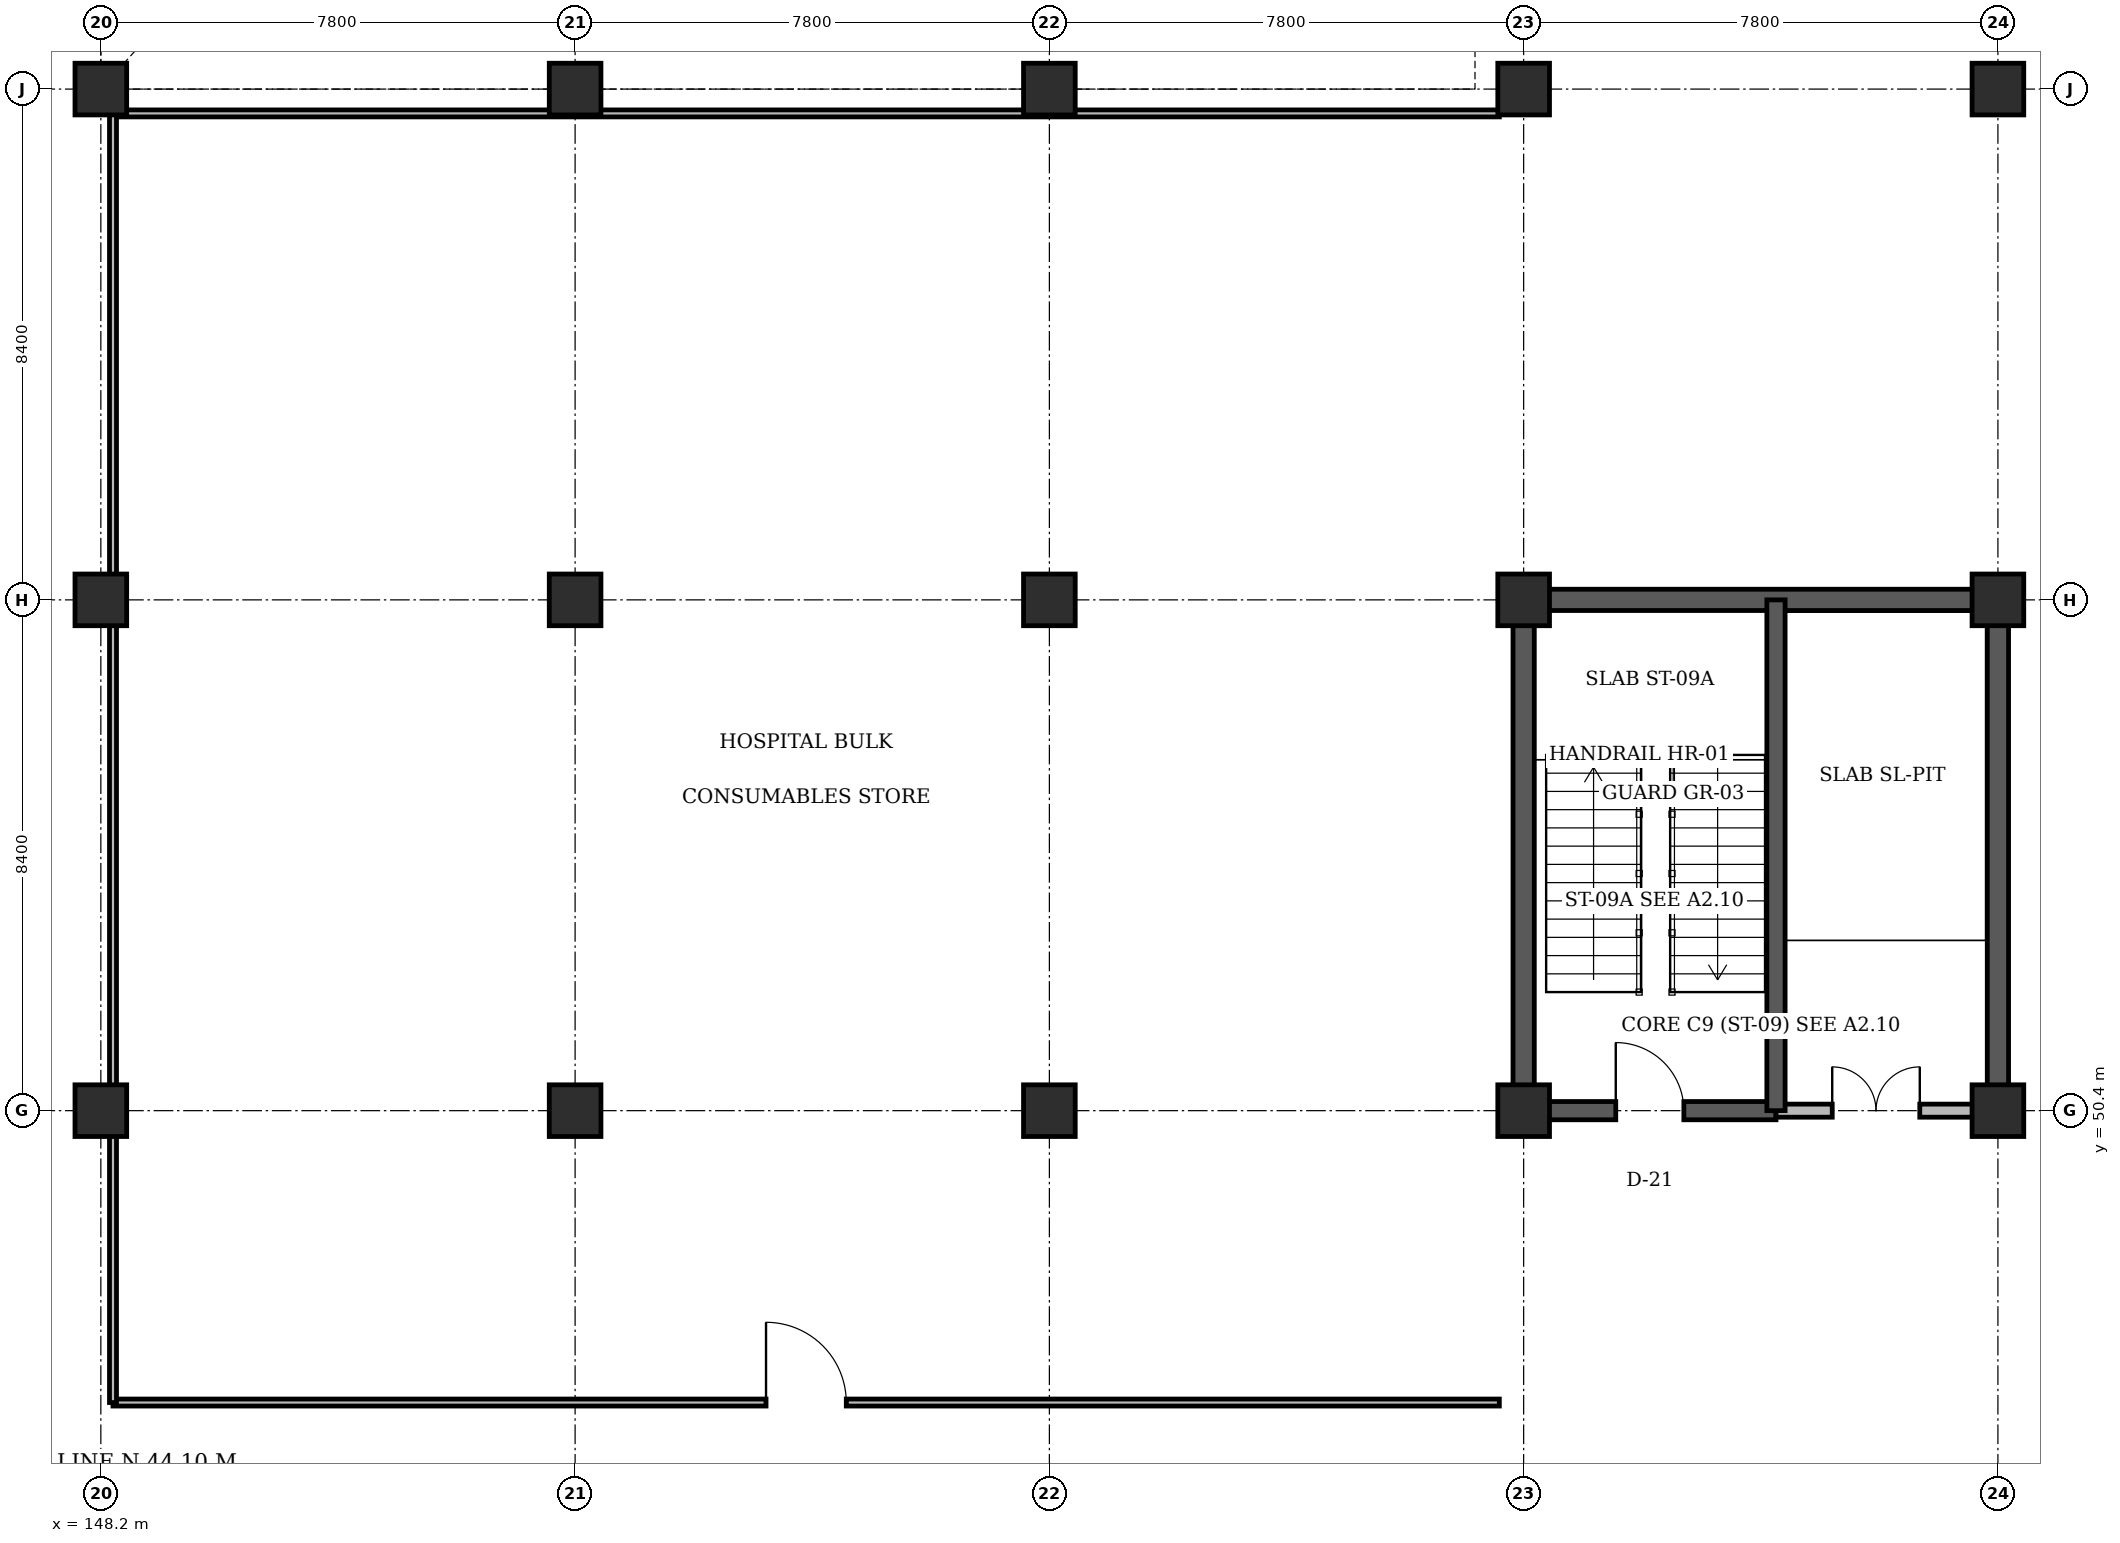
"""IFC4 building model, lengths in metres.
Left out: names, types, materials, properties, quantities, classifications, styles, units other than length and angle.
Written with IfcOpenShell. Run it as: python <this file> out.ifc"""

import sys

from ifc_helpers import new_model, si_unit, direction, frame, frame_2d, origin, origin_2d, place, context, subcontext, project, spatial, rectangle, extrude, element, fill, save


model = new_model("IFC4")
c1 = context("Model", 3, precision=1e-05, world=origin(), true_north=direction((0.0, 1.0)))
c2 = subcontext(c1, "Body", "Model", "MODEL_VIEW")
j1 = project(units=[si_unit("LENGTHUNIT", "METRE"), si_unit("PLANEANGLEUNIT", "RADIAN")], contexts=[c1])
p1 = place(None, origin())
s1 = spatial("IfcSite", under=j1, at=p1, CompositionType="ELEMENT")
p2 = place(p1, origin())
s2 = spatial("IfcBuilding", under=s1, at=p2, CompositionType="ELEMENT")
p3 = place(p2, frame((0.0, 0.0, -4.8)))
s3 = spatial("IfcBuildingStorey", under=s2, at=p3, CompositionType="ELEMENT", Elevation=-4.8)
p4 = place(p3, frame((171.425, 58.8, 0.0), z_axis=(0.0, 0.0, 1.0), x_axis=(1.0, 0.0, 0.0)))
e1 = element("IfcWall", 1, at=p4, inside=s3, PredefinedType="SHEAR", context=c2, shape_type="SweptSolid", body=[
    extrude(rectangle(XDim=8.15, YDim=0.35, at=frame_2d((4.075, 0.0))), origin(), (0.0, 0.0, 1.0), 4.4),
])
for number, where, z_axis, x_axis in (
    (2, (171.6, 50.4, 0.0), (0.0, 0.0, 1.0), (0.0, 1.0, 0.0)),
    (3, (179.4, 50.4, 0.0), (0.0, 0.0, 1.0), (0.0, 1.0, 0.0)),
):
    element("IfcWall", number, at=place(p3, frame(where, z_axis=z_axis, x_axis=x_axis)), inside=s3, PredefinedType="SHEAR", context=c2, shape_type="SweptSolid", body=[
        extrude(rectangle(XDim=8.4, YDim=0.35, at=frame_2d((4.2, 0.0))), origin(), (0.0, 0.0, 1.0), 4.4),
    ])
for number, where, z_axis, x_axis in (
    (4, (148.2, 50.4, 0.0), (0.0, 0.0, 1.0), (1.0, 0.0, 0.0)),
    (5, (148.2, 58.8, 0.0), (0.0, 0.0, 1.0), (1.0, 0.0, 0.0)),
    (6, (148.2, 67.2, 0.0), (0.0, 0.0, 1.0), (1.0, 0.0, 0.0)),
    (7, (156.0, 50.4, 0.0), (0.0, 0.0, 1.0), (1.0, 0.0, 0.0)),
    (8, (156.0, 58.8, 0.0), (0.0, 0.0, 1.0), (1.0, 0.0, 0.0)),
    (9, (156.0, 67.2, 0.0), (0.0, 0.0, 1.0), (1.0, 0.0, 0.0)),
    (10, (163.8, 50.4, 0.0), (0.0, 0.0, 1.0), (1.0, 0.0, 0.0)),
    (11, (163.8, 58.8, 0.0), (0.0, 0.0, 1.0), (1.0, 0.0, 0.0)),
    (12, (163.8, 67.2, 0.0), (0.0, 0.0, 1.0), (1.0, 0.0, 0.0)),
    (13, (171.6, 50.4, 0.0), (0.0, 0.0, 1.0), (1.0, 0.0, 0.0)),
    (14, (171.6, 58.8, 0.0), (0.0, 0.0, 1.0), (1.0, 0.0, 0.0)),
    (15, (171.6, 67.2, 0.0), (0.0, 0.0, 1.0), (1.0, 0.0, 0.0)),
    (16, (179.4, 50.4, 0.0), (0.0, 0.0, 1.0), (1.0, 0.0, 0.0)),
    (17, (179.4, 58.8, 0.0), (0.0, 0.0, 1.0), (1.0, 0.0, 0.0)),
    (18, (179.4, 67.2, 0.0), (0.0, 0.0, 1.0), (1.0, 0.0, 0.0)),
):
    element("IfcColumn", number, at=place(p3, frame(where, z_axis=z_axis, x_axis=x_axis)), inside=s3, PredefinedType="COLUMN", context=c2, shape_type="SweptSolid", body=[
        extrude(rectangle(XDim=0.85, YDim=0.85, at=origin_2d()), origin(), (0.0, 0.0, 1.0), 4.8),
    ])
p5 = place(p3, frame((171.6, 50.4, 0.0), z_axis=(0.0, 0.0, 1.0), x_axis=(1.0, 0.0, 0.0)))
e19 = element("IfcWall", 19, at=p5, inside=s3, PredefinedType="SHEAR", context=c2, shape_type="SweptSolid", body=[
    extrude(rectangle(XDim=4.15, YDim=0.3, at=frame_2d((2.075, 0.0))), origin(), (0.0, 0.0, 1.0), 4.8),
])
p6 = place(p5, frame((1.515, 0.0, 0.0)))
e20 = element("IfcOpeningElement", 20, at=p6, cuts=e19, PredefinedType="OPENING", context=c2, shape_type="SweptSolid", body=[
    extrude(rectangle(XDim=1.12, YDim=2.15, at=frame_2d((0.56, 1.075))), frame((0.0, 0.16, 0.0), z_axis=(0.0, -1.0, 0.0), x_axis=(1.0, 0.0, 0.0)), (0.0, 0.0, 1.0), 0.32),
])
p7 = place(p3, frame((175.75, 50.4, 0.0), z_axis=(0.0, 0.0, 1.0), x_axis=(1.0, 0.0, 0.0)))
e21 = element("IfcWall", 21, at=p7, inside=s3, PredefinedType="STANDARD", context=c2, shape_type="SweptSolid", body=[
    extrude(rectangle(XDim=3.29, YDim=0.215, at=frame_2d((1.645, 0.0))), origin(), (0.0, 0.0, 1.0), 3.53),
])
p8 = place(p7, frame((0.925, 0.0, 0.0)))
e22 = element("IfcOpeningElement", 22, at=p8, cuts=e21, PredefinedType="OPENING", context=c2, shape_type="SweptSolid", body=[
    extrude(rectangle(XDim=1.44, YDim=2.2, at=frame_2d((0.72, 1.1))), frame((0.0, 0.118, 0.0), z_axis=(0.0, -1.0, 0.0), x_axis=(1.0, 0.0, 0.0)), (0.0, 0.0, 1.0), 0.235),
])
p9 = place(p3, frame((175.75, 50.4, 0.0), z_axis=(0.0, 0.0, 1.0), x_axis=(0.0, 1.0, 0.0)))
e23 = element("IfcWall", 23, at=p9, inside=s3, PredefinedType="SHEAR", context=c2, shape_type="SweptSolid", body=[
    extrude(rectangle(XDim=8.4, YDim=0.3, at=frame_2d((4.2, 0.0))), origin(), (0.0, 0.0, 1.0), 4.8),
])
p10 = place(p3, frame((148.4, 45.6, 0.0), z_axis=(0.0, 0.0, 1.0), x_axis=(1.0, 0.0, 0.0)))
e24 = element("IfcWall", 24, at=p10, inside=s3, PredefinedType="PARTITIONING", context=c2, shape_type="SweptSolid", body=[
    extrude(rectangle(XDim=22.8, YDim=0.115, at=frame_2d((11.4, 0.0))), origin(), (0.0, 0.0, 1.0), 4.46),
])
p11 = place(p10, frame((10.74, 0.0, 0.0)))
e25 = element("IfcOpeningElement", 25, at=p11, cuts=e24, PredefinedType="OPENING", context=c2, shape_type="SweptSolid", body=[
    extrude(rectangle(XDim=1.32, YDim=2.15, at=frame_2d((0.66, 1.075))), frame((0.0, 0.067, 0.0), z_axis=(0.0, -1.0, 0.0), x_axis=(1.0, 0.0, 0.0)), (0.0, 0.0, 1.0), 0.135),
])
p12 = place(p3, frame((148.4, 66.8, 0.0), z_axis=(0.0, 0.0, 1.0), x_axis=(1.0, 0.0, 0.0)))
e26 = element("IfcWall", 26, at=p12, inside=s3, PredefinedType="PARTITIONING", context=c2, shape_type="SweptSolid", body=[
    extrude(rectangle(XDim=22.8, YDim=0.115, at=frame_2d((11.4, 0.0))), origin(), (0.0, 0.0, 1.0), 3.53),
])
p13 = place(p3, frame((148.4, 45.6, 0.0), z_axis=(0.0, 0.0, 1.0), x_axis=(0.0, 1.0, 0.0)))
e27 = element("IfcWall", 27, at=p13, inside=s3, PredefinedType="PARTITIONING", context=c2, shape_type="SweptSolid", body=[
    extrude(rectangle(XDim=21.2, YDim=0.115, at=frame_2d((10.6, 0.0))), origin(), (0.0, 0.0, 1.0), 3.515),
])
p14 = place(p6, origin())
e28 = element("IfcDoor", 28, at=p14, inside=s3, OperationType="SINGLE_SWING_LEFT", PredefinedType="DOOR", context=c2, shape_type="SweptSolid", body=[
    extrude(rectangle(XDim=1.12, YDim=2.15, at=frame_2d((0.56, 1.075))), frame((0.0, 0.025, 0.0), z_axis=(0.0, -1.0, 0.0), x_axis=(1.0, 0.0, 0.0)), (0.0, 0.0, 1.0), 0.05),
])
fill(e20, e28)
p15 = place(p8, origin())
e29 = element("IfcDoor", 29, at=p15, inside=s3, OperationType="DOUBLE_DOOR_SINGLE_SWING", PredefinedType="DOOR", context=c2, shape_type="SweptSolid", body=[
    extrude(rectangle(XDim=1.44, YDim=2.2, at=frame_2d((0.72, 1.1))), frame((0.0, 0.025, 0.0), z_axis=(0.0, -1.0, 0.0), x_axis=(1.0, 0.0, 0.0)), (0.0, 0.0, 1.0), 0.05),
])
fill(e22, e29)
p16 = place(p11, origin())
e30 = element("IfcDoor", 30, at=p16, inside=s3, OperationType="SINGLE_SWING_LEFT", PredefinedType="DOOR", context=c2, shape_type="SweptSolid", body=[
    extrude(rectangle(XDim=1.32, YDim=2.15, at=frame_2d((0.66, 1.075))), frame((0.0, 0.025, 0.0), z_axis=(0.0, -1.0, 0.0), x_axis=(1.0, 0.0, 0.0)), (0.0, 0.0, 1.0), 0.05),
])
fill(e25, e30)
save(model, sys.argv[1])
